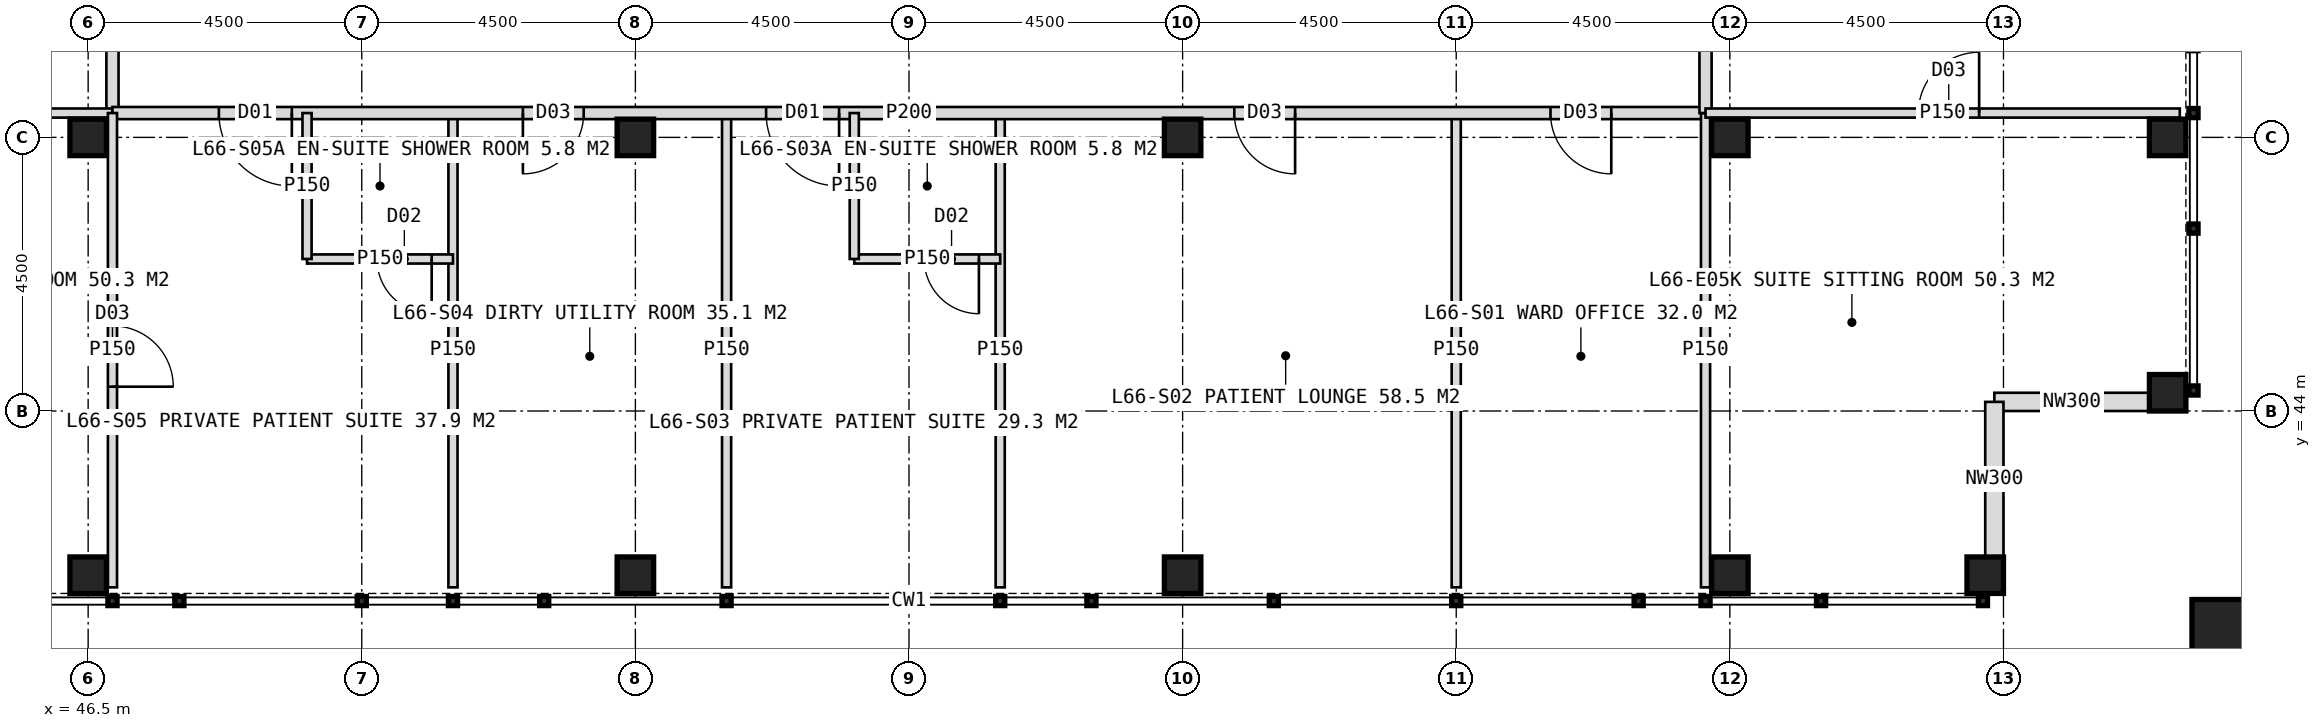
"""IFC4 building model, lengths in metres.
Left out: names, types, materials, properties, quantities, classifications, styles, units other than length and angle.
Written with IfcOpenShell. Run it as: python <this file> out.ifc"""

import sys

from ifc_helpers import new_model, si_unit, direction, frame, frame_2d, origin, origin_2d, place, context, subcontext, project, spatial, rectangle, hollow_rectangle, extrude, element, fill, save


model = new_model("IFC4")
c1 = context("Model", 3, precision=1e-05, world=origin(), true_north=direction((0.0, 1.0)))
c2 = subcontext(c1, "Body", "Model", "MODEL_VIEW")
j1 = project(units=[si_unit("LENGTHUNIT", "METRE"), si_unit("PLANEANGLEUNIT", "RADIAN")], contexts=[c1])
p1 = place(None, origin())
s1 = spatial("IfcSite", under=j1, at=p1, CompositionType="ELEMENT")
p2 = place(p1, origin())
s2 = spatial("IfcBuilding", under=s1, at=p2, CompositionType="ELEMENT")
p3 = place(p2, frame((0.0, 0.0, 274.0)))
s3 = spatial("IfcBuildingStorey", under=s2, at=p3, CompositionType="ELEMENT", Elevation=274.0)
for number, where, z_axis, x_axis in (
    (1, (46.5, 48.5, 0.0), (0.0, 0.0, 1.0), (1.0, 0.0, 0.0)),
    (2, (73.5, 48.5, 0.0), (0.0, 0.0, 1.0), (1.0, 0.0, 0.0)),
    (3, (55.5, 48.5, 0.0), (0.0, 0.0, 1.0), (1.0, 0.0, 0.0)),
    (4, (64.5, 48.5, 0.0), (0.0, 0.0, 1.0), (1.0, 0.0, 0.0)),
    (5, (80.7, 44.3, 0.0), (0.0, 0.0, 1.0), (1.0, 0.0, 0.0)),
    (6, (46.5, 41.3, 0.0), (0.0, 0.0, 1.0), (1.0, 0.0, 0.0)),
    (7, (80.7, 48.5, 0.0), (0.0, 0.0, 1.0), (1.0, 0.0, 0.0)),
    (8, (55.5, 41.3, 0.0), (0.0, 0.0, 1.0), (1.0, 0.0, 0.0)),
    (9, (64.5, 41.3, 0.0), (0.0, 0.0, 1.0), (1.0, 0.0, 0.0)),
    (10, (73.5, 41.3, 0.0), (0.0, 0.0, 1.0), (1.0, 0.0, 0.0)),
    (11, (77.7, 41.3, 0.0), (0.0, 0.0, 1.0), (1.0, 0.0, 0.0)),
):
    element("IfcColumn", number, at=place(p3, frame(where, z_axis=z_axis, x_axis=x_axis)), inside=s3, PredefinedType="COLUMN", context=c2, shape_type="SweptSolid", body=[
        extrude(hollow_rectangle(XDim=0.6, YDim=0.6, WallThickness=0.04, at=origin_2d()), origin(), (0.0, 0.0, 1.0), 4.0),
    ])
p4 = place(p3, frame((81.6, 40.4, 0.0), z_axis=(0.0, 0.0, 1.0), x_axis=(1.0, 0.0, 0.0)))
e12 = element("IfcColumn", 12, at=p4, inside=s3, PredefinedType="COLUMN", context=c2, shape_type="SweptSolid", body=[
    extrude(hollow_rectangle(XDim=1.0, YDim=1.0, WallThickness=0.06, at=origin_2d()), origin(), (0.0, 0.0, 1.0), 4.0),
])
for number, where, z_axis, x_axis in (
    (13, (80.4, 44.15, 0.0), (0.0, 0.0, 1.0), (-1.0, 0.0, 0.0)),
    (14, (77.85, 44.15, 0.0), (0.0, 0.0, 1.0), (0.0, -1.0, 0.0)),
):
    element("IfcWall", number, at=place(p3, frame(where, z_axis=z_axis, x_axis=x_axis)), inside=s3, PredefinedType="ELEMENTEDWALL", context=c2, shape_type="SweptSolid", body=[
        extrude(rectangle(XDim=2.55, YDim=0.3, at=frame_2d((1.275, 0.0))), origin(), (0.0, 0.0, 1.0), 2.95),
    ])
p5 = place(p3, frame((46.9, 48.9, 0.0), z_axis=(0.0, 0.0, 1.0), x_axis=(0.0, 1.0, 0.0)))
e15 = element("IfcWall", 15, at=p5, inside=s3, PredefinedType="PARTITIONING", context=c2, shape_type="SweptSolid", body=[
    extrude(rectangle(XDim=26.2, YDim=0.2, at=frame_2d((13.1, 0.0))), origin(), (0.0, 0.0, 1.0), 3.75),
])
p6 = place(p5, frame((1.75, 0.0, 0.0)))
e16 = element("IfcOpeningElement", 16, at=p6, cuts=e15, PredefinedType="OPENING", context=c2, shape_type="SweptSolid", body=[
    extrude(rectangle(XDim=1.2, YDim=2.2, at=frame_2d((0.6, 1.1))), frame((0.0, 0.11, 0.0), z_axis=(0.0, -1.0, 0.0), x_axis=(1.0, 0.0, 0.0)), (0.0, 0.0, 1.0), 0.22),
])
p7 = place(p5, frame((6.75, 0.0, 0.0)))
e17 = element("IfcOpeningElement", 17, at=p7, cuts=e15, PredefinedType="OPENING", context=c2, shape_type="SweptSolid", body=[
    extrude(rectangle(XDim=1.0, YDim=2.1, at=frame_2d((0.5, 1.05))), frame((0.0, 0.11, 0.0), z_axis=(0.0, -1.0, 0.0), x_axis=(1.0, 0.0, 0.0)), (0.0, 0.0, 1.0), 0.22),
])
p8 = place(p5, frame((11.1, 0.0, 0.0)))
e18 = element("IfcOpeningElement", 18, at=p8, cuts=e15, PredefinedType="OPENING", context=c2, shape_type="SweptSolid", body=[
    extrude(rectangle(XDim=1.0, YDim=2.1, at=frame_2d((0.5, 1.05))), frame((0.0, 0.11, 0.0), z_axis=(0.0, -1.0, 0.0), x_axis=(1.0, 0.0, 0.0)), (0.0, 0.0, 1.0), 0.22),
])
p9 = place(p5, frame((15.75, 0.0, 0.0)))
e19 = element("IfcOpeningElement", 19, at=p9, cuts=e15, PredefinedType="OPENING", context=c2, shape_type="SweptSolid", body=[
    extrude(rectangle(XDim=1.0, YDim=2.1, at=frame_2d((0.5, 1.05))), frame((0.0, 0.11, 0.0), z_axis=(0.0, -1.0, 0.0), x_axis=(1.0, 0.0, 0.0)), (0.0, 0.0, 1.0), 0.22),
])
p10 = place(p5, frame((23.25, 0.0, 0.0)))
e20 = element("IfcOpeningElement", 20, at=p10, cuts=e15, PredefinedType="OPENING", context=c2, shape_type="SweptSolid", body=[
    extrude(rectangle(XDim=1.2, YDim=2.2, at=frame_2d((0.6, 1.1))), frame((0.0, 0.11, 0.0), z_axis=(0.0, -1.0, 0.0), x_axis=(1.0, 0.0, 0.0)), (0.0, 0.0, 1.0), 0.22),
])
for number, where, z_axis, x_axis in (
    (21, (46.9, 48.9, 0.0), (0.0, 0.0, 1.0), (-1.0, 0.0, 0.0)),
    (22, (69.0, 48.9, 0.0), (0.0, 0.0, 1.0), (0.0, -1.0, 0.0)),
    (23, (61.5, 48.9, 0.0), (0.0, 0.0, 1.0), (0.0, -1.0, 0.0)),
    (24, (57.0, 48.9, 0.0), (0.0, 0.0, 1.0), (0.0, -1.0, 0.0)),
    (25, (52.5, 48.9, 0.0), (0.0, 0.0, 1.0), (0.0, -1.0, 0.0)),
):
    element("IfcWall", number, at=place(p3, frame(where, z_axis=z_axis, x_axis=x_axis)), inside=s3, PredefinedType="PARTITIONING", context=c2, shape_type="SweptSolid", body=[
        extrude(rectangle(XDim=7.8, YDim=0.15, at=frame_2d((3.9, 0.0))), origin(), (0.0, 0.0, 1.0), 3.75),
    ])
p11 = place(p3, frame((73.1, 48.9, 0.0), z_axis=(0.0, 0.0, 1.0), x_axis=(-1.0, 0.0, 0.0)))
e26 = element("IfcWall", 26, at=p11, inside=s3, PredefinedType="PARTITIONING", context=c2, shape_type="SweptSolid", body=[
    extrude(rectangle(XDim=26.2, YDim=0.2, at=frame_2d((13.1, 0.0))), origin(), (0.0, 0.0, 1.0), 3.75),
])
p12 = place(p11, frame((1.55, 0.0, 0.0)))
e27 = element("IfcOpeningElement", 27, at=p12, cuts=e26, PredefinedType="OPENING", context=c2, shape_type="SweptSolid", body=[
    extrude(rectangle(XDim=1.0, YDim=2.1, at=frame_2d((0.5, 1.05))), frame((0.0, 0.11, 0.0), z_axis=(0.0, -1.0, 0.0), x_axis=(1.0, 0.0, 0.0)), (0.0, 0.0, 1.0), 0.22),
])
p13 = place(p11, frame((6.75, 0.0, 0.0)))
e28 = element("IfcOpeningElement", 28, at=p13, cuts=e26, PredefinedType="OPENING", context=c2, shape_type="SweptSolid", body=[
    extrude(rectangle(XDim=1.0, YDim=2.1, at=frame_2d((0.5, 1.05))), frame((0.0, 0.11, 0.0), z_axis=(0.0, -1.0, 0.0), x_axis=(1.0, 0.0, 0.0)), (0.0, 0.0, 1.0), 0.22),
])
p14 = place(p11, frame((14.25, 0.0, 0.0)))
e29 = element("IfcOpeningElement", 29, at=p14, cuts=e26, PredefinedType="OPENING", context=c2, shape_type="SweptSolid", body=[
    extrude(rectangle(XDim=1.2, YDim=2.2, at=frame_2d((0.6, 1.1))), frame((0.0, 0.11, 0.0), z_axis=(0.0, -1.0, 0.0), x_axis=(1.0, 0.0, 0.0)), (0.0, 0.0, 1.0), 0.22),
])
p15 = place(p11, frame((18.45, 0.0, 0.0)))
e30 = element("IfcOpeningElement", 30, at=p15, cuts=e26, PredefinedType="OPENING", context=c2, shape_type="SweptSolid", body=[
    extrude(rectangle(XDim=1.0, YDim=2.1, at=frame_2d((0.5, 1.05))), frame((0.0, 0.11, 0.0), z_axis=(0.0, -1.0, 0.0), x_axis=(1.0, 0.0, 0.0)), (0.0, 0.0, 1.0), 0.22),
])
p16 = place(p11, frame((23.25, 0.0, 0.0)))
e31 = element("IfcOpeningElement", 31, at=p16, cuts=e26, PredefinedType="OPENING", context=c2, shape_type="SweptSolid", body=[
    extrude(rectangle(XDim=1.2, YDim=2.2, at=frame_2d((0.6, 1.1))), frame((0.0, 0.11, 0.0), z_axis=(0.0, -1.0, 0.0), x_axis=(1.0, 0.0, 0.0)), (0.0, 0.0, 1.0), 0.22),
])
p17 = place(p3, frame((73.1, 48.9, 0.0), z_axis=(0.0, 0.0, 1.0), x_axis=(0.0, -1.0, 0.0)))
e32 = element("IfcWall", 32, at=p17, inside=s3, PredefinedType="PARTITIONING", context=c2, shape_type="SweptSolid", body=[
    extrude(rectangle(XDim=7.8, YDim=0.15, at=frame_2d((3.9, 0.0))), origin(), (0.0, 0.0, 1.0), 3.75),
])
p18 = place(p3, frame((61.5, 46.5, 0.0), z_axis=(0.0, 0.0, 1.0), x_axis=(-1.0, 0.0, 0.0)))
e33 = element("IfcWall", 33, at=p18, inside=s3, PredefinedType="PARTITIONING", context=c2, shape_type="SweptSolid", body=[
    extrude(rectangle(XDim=2.4, YDim=0.15, at=frame_2d((1.2, 0.0))), origin(), (0.0, 0.0, 1.0), 3.75),
])
p19 = place(p18, frame((0.35, 0.0, 0.0)))
e34 = element("IfcOpeningElement", 34, at=p19, cuts=e33, PredefinedType="OPENING", context=c2, shape_type="SweptSolid", body=[
    extrude(rectangle(XDim=0.9, YDim=2.1, at=frame_2d((0.45, 1.05))), frame((0.0, 0.085, 0.0), z_axis=(0.0, -1.0, 0.0), x_axis=(1.0, 0.0, 0.0)), (0.0, 0.0, 1.0), 0.17),
])
p20 = place(p3, frame((59.1, 48.9, 0.0), z_axis=(0.0, 0.0, 1.0), x_axis=(0.0, -1.0, 0.0)))
e35 = element("IfcWall", 35, at=p20, inside=s3, PredefinedType="PARTITIONING", context=c2, shape_type="SweptSolid", body=[
    extrude(rectangle(XDim=2.4, YDim=0.15, at=frame_2d((1.2, 0.0))), origin(), (0.0, 0.0, 1.0), 3.75),
])
p21 = place(p3, frame((46.9, 48.9, 0.0), z_axis=(0.0, 0.0, 1.0), x_axis=(0.0, -1.0, 0.0)))
e36 = element("IfcWall", 36, at=p21, inside=s3, PredefinedType="PARTITIONING", context=c2, shape_type="SweptSolid", body=[
    extrude(rectangle(XDim=7.8, YDim=0.15, at=frame_2d((3.9, 0.0))), origin(), (0.0, 0.0, 1.0), 3.75),
])
p22 = place(p21, frame((3.5, 0.0, 0.0)))
e37 = element("IfcOpeningElement", 37, at=p22, cuts=e36, PredefinedType="OPENING", context=c2, shape_type="SweptSolid", body=[
    extrude(rectangle(XDim=1.0, YDim=2.1, at=frame_2d((0.5, 1.05))), frame((0.0, 0.085, 0.0), z_axis=(0.0, -1.0, 0.0), x_axis=(1.0, 0.0, 0.0)), (0.0, 0.0, 1.0), 0.17),
])
p23 = place(p3, frame((52.5, 46.5, 0.0), z_axis=(0.0, 0.0, 1.0), x_axis=(-1.0, 0.0, 0.0)))
e38 = element("IfcWall", 38, at=p23, inside=s3, PredefinedType="PARTITIONING", context=c2, shape_type="SweptSolid", body=[
    extrude(rectangle(XDim=2.4, YDim=0.15, at=frame_2d((1.2, 0.0))), origin(), (0.0, 0.0, 1.0), 3.75),
])
p24 = place(p23, frame((0.35, 0.0, 0.0)))
e39 = element("IfcOpeningElement", 39, at=p24, cuts=e38, PredefinedType="OPENING", context=c2, shape_type="SweptSolid", body=[
    extrude(rectangle(XDim=0.9, YDim=2.1, at=frame_2d((0.45, 1.05))), frame((0.0, 0.085, 0.0), z_axis=(0.0, -1.0, 0.0), x_axis=(1.0, 0.0, 0.0)), (0.0, 0.0, 1.0), 0.17),
])
p25 = place(p3, frame((50.1, 48.9, 0.0), z_axis=(0.0, 0.0, 1.0), x_axis=(0.0, -1.0, 0.0)))
e40 = element("IfcWall", 40, at=p25, inside=s3, PredefinedType="PARTITIONING", context=c2, shape_type="SweptSolid", body=[
    extrude(rectangle(XDim=2.4, YDim=0.15, at=frame_2d((1.2, 0.0))), origin(), (0.0, 0.0, 1.0), 3.75),
])
p26 = place(p3, frame((73.1, 71.0, 0.0), z_axis=(0.0, 0.0, 1.0), x_axis=(0.0, -1.0, 0.0)))
e41 = element("IfcWall", 41, at=p26, inside=s3, PredefinedType="PARTITIONING", context=c2, shape_type="SweptSolid", body=[
    extrude(rectangle(XDim=22.1, YDim=0.2, at=frame_2d((11.05, 0.0))), origin(), (0.0, 0.0, 1.0), 3.75),
])
p27 = place(p26, frame((2.5, 0.0, 0.0)))
e42 = element("IfcOpeningElement", 42, at=p27, cuts=e41, PredefinedType="OPENING", context=c2, shape_type="SweptSolid", body=[
    extrude(rectangle(XDim=1.0, YDim=2.1, at=frame_2d((0.5, 1.05))), frame((0.0, 0.11, 0.0), z_axis=(0.0, -1.0, 0.0), x_axis=(1.0, 0.0, 0.0)), (0.0, 0.0, 1.0), 0.22),
])
p28 = place(p26, frame((7.0, 0.0, 0.0)))
e43 = element("IfcOpeningElement", 43, at=p28, cuts=e41, PredefinedType="OPENING", context=c2, shape_type="SweptSolid", body=[
    extrude(rectangle(XDim=1.0, YDim=2.1, at=frame_2d((0.5, 1.05))), frame((0.0, 0.11, 0.0), z_axis=(0.0, -1.0, 0.0), x_axis=(1.0, 0.0, 0.0)), (0.0, 0.0, 1.0), 0.22),
])
p29 = place(p26, frame((9.75, 0.0, 0.0)))
e44 = element("IfcOpeningElement", 44, at=p29, cuts=e41, PredefinedType="OPENING", context=c2, shape_type="SweptSolid", body=[
    extrude(rectangle(XDim=0.9, YDim=2.1, at=frame_2d((0.45, 1.05))), frame((0.0, 0.11, 0.0), z_axis=(0.0, -1.0, 0.0), x_axis=(1.0, 0.0, 0.0)), (0.0, 0.0, 1.0), 0.22),
])
p30 = place(p26, frame((11.65, 0.0, 0.0)))
e45 = element("IfcOpeningElement", 45, at=p30, cuts=e41, PredefinedType="OPENING", context=c2, shape_type="SweptSolid", body=[
    extrude(rectangle(XDim=1.0, YDim=2.1, at=frame_2d((0.5, 1.05))), frame((0.0, 0.11, 0.0), z_axis=(0.0, -1.0, 0.0), x_axis=(1.0, 0.0, 0.0)), (0.0, 0.0, 1.0), 0.22),
])
p31 = place(p26, frame((19.15, 0.0, 0.0)))
e46 = element("IfcOpeningElement", 46, at=p31, cuts=e41, PredefinedType="OPENING", context=c2, shape_type="SweptSolid", body=[
    extrude(rectangle(XDim=1.2, YDim=2.2, at=frame_2d((0.6, 1.1))), frame((0.0, 0.11, 0.0), z_axis=(0.0, -1.0, 0.0), x_axis=(1.0, 0.0, 0.0)), (0.0, 0.0, 1.0), 0.22),
])
p32 = place(p3, frame((73.1, 48.9, 0.0), z_axis=(0.0, 0.0, 1.0), x_axis=(1.0, 0.0, 0.0)))
e47 = element("IfcWall", 47, at=p32, inside=s3, PredefinedType="PARTITIONING", context=c2, shape_type="SweptSolid", body=[
    extrude(rectangle(XDim=7.8, YDim=0.15, at=frame_2d((3.9, 0.0))), origin(), (0.0, 0.0, 1.0), 3.75),
])
p33 = place(p32, frame((3.5, 0.0, 0.0)))
e48 = element("IfcOpeningElement", 48, at=p33, cuts=e47, PredefinedType="OPENING", context=c2, shape_type="SweptSolid", body=[
    extrude(rectangle(XDim=1.0, YDim=2.1, at=frame_2d((0.5, 1.05))), frame((0.0, 0.085, 0.0), z_axis=(0.0, -1.0, 0.0), x_axis=(1.0, 0.0, 0.0)), (0.0, 0.0, 1.0), 0.17),
])
p34 = place(p12, origin())
e49 = element("IfcDoor", 49, at=p34, inside=s3, OperationType="SINGLE_SWING_LEFT", PredefinedType="DOOR", context=c2, shape_type="SweptSolid", body=[
    extrude(rectangle(XDim=1.0, YDim=2.1, at=frame_2d((0.5, 1.05))), frame((0.0, 0.025, 0.0), z_axis=(0.0, -1.0, 0.0), x_axis=(1.0, 0.0, 0.0)), (0.0, 0.0, 1.0), 0.05),
])
fill(e27, e49)
p35 = place(p13, origin())
e50 = element("IfcDoor", 50, at=p35, inside=s3, OperationType="SINGLE_SWING_LEFT", PredefinedType="DOOR", context=c2, shape_type="SweptSolid", body=[
    extrude(rectangle(XDim=1.0, YDim=2.1, at=frame_2d((0.5, 1.05))), frame((0.0, 0.025, 0.0), z_axis=(0.0, -1.0, 0.0), x_axis=(1.0, 0.0, 0.0)), (0.0, 0.0, 1.0), 0.05),
])
fill(e28, e50)
p36 = place(p14, origin())
e51 = element("IfcDoor", 51, at=p36, inside=s3, OperationType="SINGLE_SWING_LEFT", PredefinedType="DOOR", context=c2, shape_type="SweptSolid", body=[
    extrude(rectangle(XDim=1.2, YDim=2.2, at=frame_2d((0.6, 1.1))), frame((0.0, 0.025, 0.0), z_axis=(0.0, -1.0, 0.0), x_axis=(1.0, 0.0, 0.0)), (0.0, 0.0, 1.0), 0.05),
])
fill(e29, e51)
p37 = place(p19, origin())
e52 = element("IfcDoor", 52, at=p37, inside=s3, OperationType="SINGLE_SWING_LEFT", PredefinedType="DOOR", context=c2, shape_type="SweptSolid", body=[
    extrude(rectangle(XDim=0.9, YDim=2.1, at=frame_2d((0.45, 1.05))), frame((0.0, 0.025, 0.0), z_axis=(0.0, -1.0, 0.0), x_axis=(1.0, 0.0, 0.0)), (0.0, 0.0, 1.0), 0.05),
])
fill(e34, e52)
p38 = place(p15, origin())
e53 = element("IfcDoor", 53, at=p38, inside=s3, OperationType="SINGLE_SWING_RIGHT", PredefinedType="DOOR", context=c2, shape_type="SweptSolid", body=[
    extrude(rectangle(XDim=1.0, YDim=2.1, at=frame_2d((0.5, 1.05))), frame((0.0, 0.025, 0.0), z_axis=(0.0, -1.0, 0.0), x_axis=(1.0, 0.0, 0.0)), (0.0, 0.0, 1.0), 0.05),
])
fill(e30, e53)
p39 = place(p22, origin())
e54 = element("IfcDoor", 54, at=p39, inside=s3, OperationType="SINGLE_SWING_RIGHT", PredefinedType="DOOR", context=c2, shape_type="SweptSolid", body=[
    extrude(rectangle(XDim=1.0, YDim=2.1, at=frame_2d((0.5, 1.05))), frame((0.0, 0.025, 0.0), z_axis=(0.0, -1.0, 0.0), x_axis=(1.0, 0.0, 0.0)), (0.0, 0.0, 1.0), 0.05),
])
fill(e37, e54)
p40 = place(p16, origin())
e55 = element("IfcDoor", 55, at=p40, inside=s3, OperationType="SINGLE_SWING_LEFT", PredefinedType="DOOR", context=c2, shape_type="SweptSolid", body=[
    extrude(rectangle(XDim=1.2, YDim=2.2, at=frame_2d((0.6, 1.1))), frame((0.0, 0.025, 0.0), z_axis=(0.0, -1.0, 0.0), x_axis=(1.0, 0.0, 0.0)), (0.0, 0.0, 1.0), 0.05),
])
fill(e31, e55)
p41 = place(p24, origin())
e56 = element("IfcDoor", 56, at=p41, inside=s3, OperationType="SINGLE_SWING_LEFT", PredefinedType="DOOR", context=c2, shape_type="SweptSolid", body=[
    extrude(rectangle(XDim=0.9, YDim=2.1, at=frame_2d((0.45, 1.05))), frame((0.0, 0.025, 0.0), z_axis=(0.0, -1.0, 0.0), x_axis=(1.0, 0.0, 0.0)), (0.0, 0.0, 1.0), 0.05),
])
fill(e39, e56)
p42 = place(p33, origin())
e57 = element("IfcDoor", 57, at=p42, inside=s3, OperationType="SINGLE_SWING_RIGHT", PredefinedType="DOOR", context=c2, shape_type="SweptSolid", body=[
    extrude(rectangle(XDim=1.0, YDim=2.1, at=frame_2d((0.5, 1.05))), frame((0.0, 0.025, 0.0), z_axis=(0.0, -1.0, 0.0), x_axis=(1.0, 0.0, 0.0)), (0.0, 0.0, 1.0), 0.05),
])
fill(e48, e57)
save(model, sys.argv[1])
